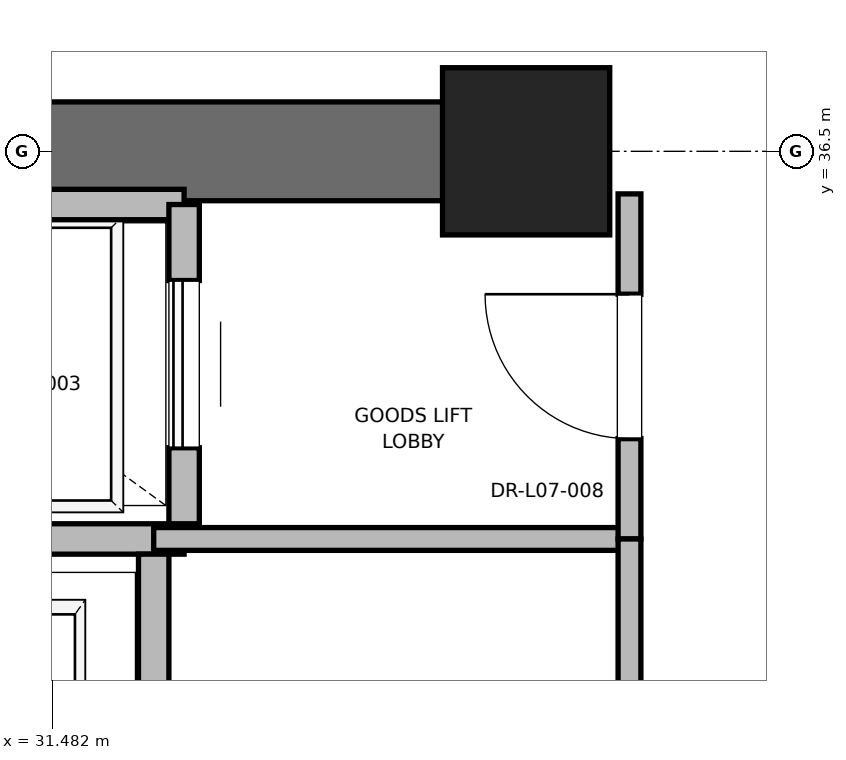
"""IFC4 building model, lengths in metres.
Left out: names, types, materials, properties, quantities, classifications, styles, units other than length and angle.
Written with IfcOpenShell. Run it as: python <this file> out.ifc"""

import sys

from ifc_helpers import new_model, si_unit, direction, frame, frame_2d, origin, origin_2d, place, context, subcontext, project, spatial, rectangle, extrude, element, fill, save


model = new_model("IFC4")
c1 = context("Model", 3, precision=1e-05, world=origin(), true_north=direction((0.0, 1.0)))
c2 = subcontext(c1, "Body", "Model", "MODEL_VIEW")
j1 = project(units=[si_unit("LENGTHUNIT", "METRE"), si_unit("PLANEANGLEUNIT", "RADIAN")], contexts=[c1])
p1 = place(None, origin())
s1 = spatial("IfcSite", under=j1, at=p1, CompositionType="ELEMENT")
p2 = place(p1, origin())
s2 = spatial("IfcBuilding", under=s1, at=p2, CompositionType="ELEMENT")
p3 = place(p2, frame((0.0, 0.0, 35.6)))
s3 = spatial("IfcBuildingStorey", under=s2, at=p3, CompositionType="ELEMENT", Elevation=35.6)
p4 = place(p3, frame((34.6, 36.5, 0.0), z_axis=(0.0, 0.0, 1.0), x_axis=(1.0, 0.0, 0.0)))
e1 = element("IfcColumn", 1, at=p4, inside=s3, PredefinedType="PILASTER", context=c2, shape_type="SweptSolid", body=[
    extrude(rectangle(XDim=1.1, YDim=1.1, at=origin_2d()), origin(), (0.0, 0.0, 1.0), 4.0),
])
p5 = place(p3, frame((29.0, 36.5, 0.0), z_axis=(0.0, 0.0, 1.0), x_axis=(1.0, 0.0, 0.0)))
e2 = element("IfcWall", 2, at=p5, inside=s3, PredefinedType="SHEAR", context=c2, shape_type="SweptSolid", body=[
    extrude(rectangle(XDim=5.8, YDim=0.65, at=frame_2d((2.9, 0.0))), origin(), (0.0, 0.0, 1.0), 3.76),
])
p6 = place(p3, frame((29.55, 33.95, 0.0), z_axis=(0.0, 0.0, 1.0), x_axis=(1.0, 0.0, 0.0)))
e3 = element("IfcWall", 3, at=p6, inside=s3, PredefinedType="SOLIDWALL", context=c2, shape_type="SweptSolid", body=[
    extrude(rectangle(XDim=2.8, YDim=0.2, at=frame_2d((1.4, 0.0))), origin(), (0.0, 0.0, 1.0), 3.76),
])
p7 = place(p3, frame((32.15, 30.85, 0.0), z_axis=(0.0, 0.0, 1.0), x_axis=(0.0, 1.0, 0.0)))
e4 = element("IfcWall", 4, at=p7, inside=s3, PredefinedType="SOLIDWALL", context=c2, shape_type="SweptSolid", body=[
    extrude(rectangle(XDim=3.0, YDim=0.2, at=frame_2d((1.5, 0.0))), origin(), (0.0, 0.0, 1.0), 3.76),
])
p8 = place(p3, frame((32.35, 36.15, 0.0), z_axis=(0.0, 0.0, 1.0), x_axis=(-1.0, 0.0, 0.0)))
e5 = element("IfcWall", 5, at=p8, inside=s3, PredefinedType="SOLIDWALL", context=c2, shape_type="SweptSolid", body=[
    extrude(rectangle(XDim=2.8, YDim=0.2, at=frame_2d((1.4, 0.0))), origin(), (0.0, 0.0, 1.0), 2.889),
])
p9 = place(p3, frame((32.35, 34.05, 0.0), z_axis=(0.0, 0.0, 1.0), x_axis=(0.0, 1.0, 0.0)))
e6 = element("IfcWall", 6, at=p9, inside=s3, PredefinedType="SOLIDWALL", context=c2, shape_type="SweptSolid", body=[
    extrude(rectangle(XDim=2.1, YDim=0.2, at=frame_2d((1.05, 0.0))), origin(), (0.0, 0.0, 1.0), 3.76),
])
p10 = place(p9, frame((0.5, 0.0, 0.0)))
e7 = element("IfcOpeningElement", 7, at=p10, cuts=e6, PredefinedType="OPENING", context=c2, shape_type="SweptSolid", body=[
    extrude(rectangle(XDim=1.1, YDim=2.2, at=frame_2d((0.55, 1.1))), frame((0.0, 0.1, 0.0), z_axis=(0.0, -1.0, 0.0), x_axis=(1.0, 0.0, 0.0)), (0.0, 0.0, 1.0), 0.2),
])
p11 = place(p3, frame((32.15, 33.95, 0.0), z_axis=(0.0, 0.0, 1.0), x_axis=(1.0, 0.0, 0.0)))
e8 = element("IfcWall", 8, at=p11, inside=s3, PredefinedType="PARTITIONING", context=c2, shape_type="SweptSolid", body=[
    extrude(rectangle(XDim=3.13, YDim=0.15, at=frame_2d((1.565, 0.0))), origin(), (0.0, 0.0, 1.0), 2.85),
])
p12 = place(p3, frame((35.28, 33.95, 0.0), z_axis=(0.0, 0.0, 1.0), x_axis=(0.0, 1.0, 0.0)))
e9 = element("IfcWall", 9, at=p12, inside=s3, PredefinedType="PARTITIONING", context=c2, shape_type="SweptSolid", body=[
    extrude(rectangle(XDim=2.27, YDim=0.15, at=frame_2d((1.135, 0.0))), origin(), (0.0, 0.0, 1.0), 2.54),
])
p13 = place(p12, frame((0.66, 0.0, 0.0)))
e10 = element("IfcOpeningElement", 10, at=p13, cuts=e9, PredefinedType="OPENING", context=c2, shape_type="SweptSolid", body=[
    extrude(rectangle(XDim=0.95, YDim=2.15, at=frame_2d((0.475, 1.075))), frame((0.0, 0.075, 0.0), z_axis=(0.0, -1.0, 0.0), x_axis=(1.0, 0.0, 0.0)), (0.0, 0.0, 1.0), 0.15),
])
p14 = place(p3, frame((35.28, 30.75, 0.0), z_axis=(0.0, 0.0, 1.0), x_axis=(0.0, 1.0, 0.0)))
e11 = element("IfcWall", 11, at=p14, inside=s3, PredefinedType="PARTITIONING", context=c2, shape_type="SweptSolid", body=[
    extrude(rectangle(XDim=3.2, YDim=0.15, at=frame_2d((1.6, 0.0))), origin(), (0.0, 0.0, 1.0), 2.85),
])
p15 = place(p14, frame((1.15, 0.0, 0.0)))
e12 = element("IfcOpeningElement", 12, at=p15, cuts=e11, PredefinedType="OPENING", context=c2, shape_type="SweptSolid", body=[
    extrude(rectangle(XDim=0.9, YDim=2.1, at=frame_2d((0.45, 1.05))), frame((0.0, 0.075, 0.0), z_axis=(0.0, -1.0, 0.0), x_axis=(1.0, 0.0, 0.0)), (0.0, 0.0, 1.0), 0.15),
])
p16 = place(p10, origin())
e13 = element("IfcDoor", 13, at=p16, inside=s3, OperationType="SLIDING_TO_RIGHT", PredefinedType="DOOR", context=c2, shape_type="SweptSolid", body=[
    extrude(rectangle(XDim=1.1, YDim=2.2, at=frame_2d((0.55, 1.1))), frame((0.0, 0.025, 0.0), z_axis=(0.0, -1.0, 0.0), x_axis=(1.0, 0.0, 0.0)), (0.0, 0.0, 1.0), 0.05),
])
fill(e7, e13)
p17 = place(p13, origin())
e14 = element("IfcDoor", 14, at=p17, inside=s3, OperationType="SINGLE_SWING_RIGHT", PredefinedType="DOOR", context=c2, shape_type="SweptSolid", body=[
    extrude(rectangle(XDim=0.95, YDim=2.15, at=frame_2d((0.475, 1.075))), frame((0.0, 0.025, 0.0), z_axis=(0.0, -1.0, 0.0), x_axis=(1.0, 0.0, 0.0)), (0.0, 0.0, 1.0), 0.05),
])
fill(e10, e14)
save(model, sys.argv[1])
